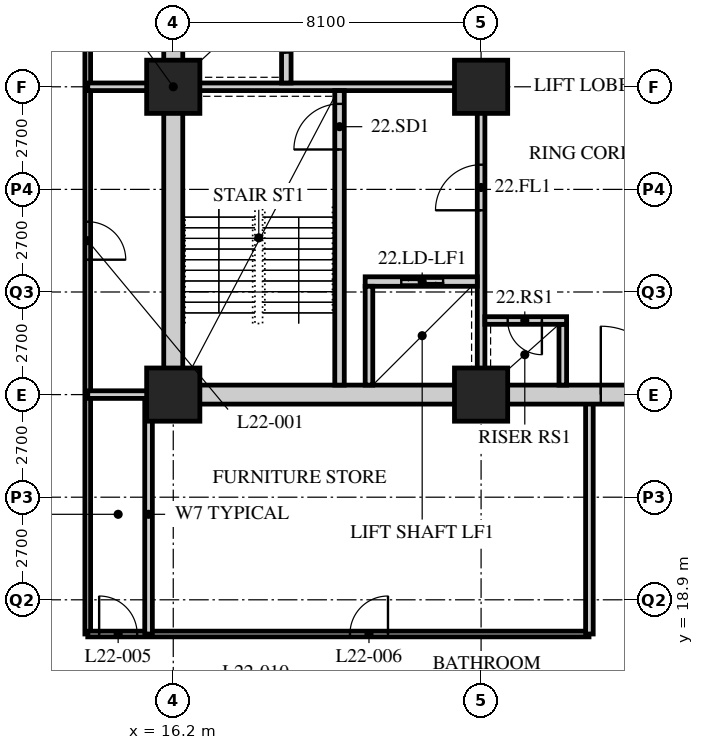
"""IFC4 building model, lengths in metres.
Left out: names, types, materials, properties, quantities, classifications, styles, units other than length and angle.
Written with IfcOpenShell. Run it as: python <this file> out.ifc"""

import sys

from ifc_helpers import new_model, si_unit, direction, frame, frame_2d, origin, origin_2d, place, context, subcontext, project, spatial, rectangle, hollow_rectangle, extrude, element, fill, save


model = new_model("IFC4")
c1 = context("Model", 3, precision=1e-05, world=origin(), true_north=direction((0.0, 1.0)))
c2 = subcontext(c1, "Body", "Model", "MODEL_VIEW")
j1 = project(units=[si_unit("LENGTHUNIT", "METRE"), si_unit("PLANEANGLEUNIT", "RADIAN")], contexts=[c1])
p1 = place(None, origin())
s1 = spatial("IfcSite", under=j1, at=p1, CompositionType="ELEMENT")
p2 = place(p1, origin())
s2 = spatial("IfcBuilding", under=s1, at=p2, CompositionType="ELEMENT")
p3 = place(p2, frame((0.0, 0.0, 87.4)))
s3 = spatial("IfcBuildingStorey", under=s2, at=p3, CompositionType="ELEMENT", Elevation=87.4)
for number, where, z_axis, x_axis in (
    (1, (16.2, 24.3, 0.0), (0.0, 0.0, 1.0), (1.0, 0.0, 0.0)),
    (2, (16.2, 32.4, 0.0), (0.0, 0.0, 1.0), (1.0, 0.0, 0.0)),
    (3, (24.3, 24.3, 0.0), (0.0, 0.0, 1.0), (1.0, 0.0, 0.0)),
    (4, (24.3, 32.4, 0.0), (0.0, 0.0, 1.0), (1.0, 0.0, 0.0)),
):
    element("IfcColumn", number, at=place(p3, frame(where, z_axis=z_axis, x_axis=x_axis)), inside=s3, PredefinedType="COLUMN", context=c2, shape_type="SweptSolid", body=[
        extrude(hollow_rectangle(XDim=1.4, YDim=1.4, WallThickness=0.12, at=origin_2d()), origin(), (0.0, 0.0, 1.0), 3.4),
    ])
p4 = place(p3, frame((13.95, 40.5, 0.0), z_axis=(0.0, 0.0, 1.0), x_axis=(0.0, -1.0, 0.0)))
e5 = element("IfcWall", 5, at=p4, inside=s3, PredefinedType="PARTITIONING", context=c2, shape_type="SweptSolid", body=[
    extrude(rectangle(XDim=22.5, YDim=0.15, at=frame_2d((11.25, 0.0))), origin(), (0.0, 0.0, 1.0), 3.15),
])
p5 = place(p4, frame((11.65, 0.0, 0.0)))
e6 = element("IfcOpeningElement", 6, at=p5, cuts=e5, PredefinedType="OPENING", context=c2, shape_type="SweptSolid", body=[
    extrude(rectangle(XDim=1.0, YDim=2.1, at=frame_2d((0.5, 1.05))), frame((0.0, 0.085, 0.0), z_axis=(0.0, -1.0, 0.0), x_axis=(1.0, 0.0, 0.0)), (0.0, 0.0, 1.0), 0.17),
])
p6 = place(p4, frame((3.55, 0.0, 0.0)))
e7 = element("IfcOpeningElement", 7, at=p6, cuts=e5, PredefinedType="OPENING", context=c2, shape_type="SweptSolid", body=[
    extrude(rectangle(XDim=1.0, YDim=2.1, at=frame_2d((0.5, 1.05))), frame((0.0, 0.085, 0.0), z_axis=(0.0, -1.0, 0.0), x_axis=(1.0, 0.0, 0.0)), (0.0, 0.0, 1.0), 0.17),
])
p7 = place(p3, frame((13.95, 18.0, 0.0), z_axis=(0.0, 0.0, 1.0), x_axis=(1.0, 0.0, 0.0)))
e8 = element("IfcWall", 8, at=p7, inside=s3, PredefinedType="PARTITIONING", context=c2, shape_type="SweptSolid", body=[
    extrude(rectangle(XDim=13.19, YDim=0.15, at=frame_2d((6.595, 0.0))), origin(), (0.0, 0.0, 1.0), 3.15),
])
p8 = place(p7, frame((0.3, 0.0, 0.0)))
e9 = element("IfcOpeningElement", 9, at=p8, cuts=e8, PredefinedType="OPENING", context=c2, shape_type="SweptSolid", body=[
    extrude(rectangle(XDim=1.0, YDim=2.1, at=frame_2d((0.5, 1.05))), frame((0.0, 0.085, 0.0), z_axis=(0.0, -1.0, 0.0), x_axis=(1.0, 0.0, 0.0)), (0.0, 0.0, 1.0), 0.17),
])
p9 = place(p7, frame((6.9, 0.0, 0.0)))
e10 = element("IfcOpeningElement", 10, at=p9, cuts=e8, PredefinedType="OPENING", context=c2, shape_type="SweptSolid", body=[
    extrude(rectangle(XDim=1.0, YDim=2.1, at=frame_2d((0.5, 1.05))), frame((0.0, 0.085, 0.0), z_axis=(0.0, -1.0, 0.0), x_axis=(1.0, 0.0, 0.0)), (0.0, 0.0, 1.0), 0.17),
])
p10 = place(p3, frame((13.95, 32.4, 0.0), z_axis=(0.0, 0.0, 1.0), x_axis=(1.0, 0.0, 0.0)))
e11 = element("IfcWall", 11, at=p10, inside=s3, PredefinedType="SOLIDWALL", context=c2, shape_type="SweptSolid", body=[
    extrude(rectangle(XDim=2.25, YDim=0.2, at=frame_2d((1.125, 0.0))), origin(), (0.0, 0.0, 1.0), 2.388),
])
for number, where, z_axis, x_axis in (
    (12, (15.55, 18.0, 0.0), (0.0, 0.0, 1.0), (0.0, 1.0, 0.0)),
    (13, (27.15, 18.0, 0.0), (0.0, 0.0, 1.0), (0.0, 1.0, 0.0)),
):
    element("IfcWall", number, at=place(p3, frame(where, z_axis=z_axis, x_axis=x_axis)), inside=s3, PredefinedType="SOLIDWALL", context=c2, shape_type="SweptSolid", body=[
        extrude(rectangle(XDim=6.3, YDim=0.2, at=frame_2d((3.15, 0.0))), origin(), (0.0, 0.0, 1.0), 3.15),
    ])
p11 = place(p3, frame((13.95, 24.3, 0.0), z_axis=(0.0, 0.0, 1.0), x_axis=(1.0, 0.0, 0.0)))
e14 = element("IfcWall", 14, at=p11, inside=s3, PredefinedType="SOLIDWALL", context=c2, shape_type="SweptSolid", body=[
    extrude(rectangle(XDim=2.25, YDim=0.2, at=frame_2d((1.125, 0.0))), origin(), (0.0, 0.0, 1.0), 2.05),
])
p12 = place(p3, frame((15.95, 24.3, 0.0), z_axis=(0.0, 0.0, 1.0), x_axis=(1.0, 0.0, 0.0)))
e15 = element("IfcWall", 15, at=p12, inside=s3, PredefinedType="SOLIDWALL", context=c2, shape_type="SweptSolid", body=[
    extrude(rectangle(XDim=8.35, YDim=0.5, at=frame_2d((4.175, 0.0))), origin(), (0.0, 0.0, 1.0), 2.388),
])
p13 = place(p3, frame((24.3, 24.3, 0.0), z_axis=(0.0, 0.0, 1.0), x_axis=(1.0, 0.0, 0.0)))
e16 = element("IfcWall", 16, at=p13, inside=s3, PredefinedType="SOLIDWALL", context=c2, shape_type="SweptSolid", body=[
    extrude(rectangle(XDim=8.1, YDim=0.5, at=frame_2d((4.05, 0.0))), origin(), (0.0, 0.0, 1.0), 2.5),
])
p14 = place(p13, frame((3.15, 0.0, 0.0)))
e17 = element("IfcOpeningElement", 17, at=p14, cuts=e16, PredefinedType="OPENING", context=c2, shape_type="SweptSolid", body=[
    extrude(rectangle(XDim=1.8, YDim=2.4, at=frame_2d((0.9, 1.2))), frame((0.0, 0.26, 0.0), z_axis=(0.0, -1.0, 0.0), x_axis=(1.0, 0.0, 0.0)), (0.0, 0.0, 1.0), 0.52),
])
p15 = place(p3, frame((16.2, 24.55, 0.0), z_axis=(0.0, 0.0, 1.0), x_axis=(0.0, 1.0, 0.0)))
e18 = element("IfcWall", 18, at=p15, inside=s3, PredefinedType="SOLIDWALL", context=c2, shape_type="SweptSolid", body=[
    extrude(rectangle(XDim=15.7, YDim=0.5, at=frame_2d((7.85, 0.0))), origin(), (0.0, 0.0, 1.0), 2.05),
])
p16 = place(p3, frame((16.45, 32.4, 0.0), z_axis=(0.0, 0.0, 1.0), x_axis=(1.0, 0.0, 0.0)))
e19 = element("IfcWall", 19, at=p16, inside=s3, PredefinedType="SOLIDWALL", context=c2, shape_type="SweptSolid", body=[
    extrude(rectangle(XDim=7.95, YDim=0.2, at=frame_2d((3.975, 0.0))), origin(), (0.0, 0.0, 1.0), 2.388),
])
p17 = place(p3, frame((24.3, 24.55, 0.0), z_axis=(0.0, 0.0, 1.0), x_axis=(0.0, 1.0, 0.0)))
e20 = element("IfcWall", 20, at=p17, inside=s3, PredefinedType="SOLIDWALL", context=c2, shape_type="SweptSolid", body=[
    extrude(rectangle(XDim=7.75, YDim=0.2, at=frame_2d((3.875, 0.0))), origin(), (0.0, 0.0, 1.0), 2.388),
])
p18 = place(p17, frame((4.6, 0.0, 0.0)))
e21 = element("IfcOpeningElement", 21, at=p18, cuts=e20, PredefinedType="OPENING", context=c2, shape_type="SweptSolid", body=[
    extrude(rectangle(XDim=1.2, YDim=2.1, at=frame_2d((0.6, 1.05))), frame((0.0, 0.11, 0.0), z_axis=(0.0, -1.0, 0.0), x_axis=(1.0, 0.0, 0.0)), (0.0, 0.0, 1.0), 0.22),
])
p19 = place(p3, frame((20.575, 24.55, 0.0), z_axis=(0.0, 0.0, 1.0), x_axis=(0.0, 1.0, 0.0)))
e22 = element("IfcWall", 22, at=p19, inside=s3, PredefinedType="SOLIDWALL", context=c2, shape_type="SweptSolid", body=[
    extrude(rectangle(XDim=7.75, YDim=0.25, at=frame_2d((3.875, 0.0))), origin(), (0.0, 0.0, 1.0), 3.15),
])
p20 = place(p19, frame((6.2, 0.0, 0.0)))
e23 = element("IfcOpeningElement", 23, at=p20, cuts=e22, PredefinedType="OPENING", context=c2, shape_type="SweptSolid", body=[
    extrude(rectangle(XDim=1.2, YDim=2.1, at=frame_2d((0.6, 1.05))), frame((0.0, 0.135, 0.0), z_axis=(0.0, -1.0, 0.0), x_axis=(1.0, 0.0, 0.0)), (0.0, 0.0, 1.0), 0.27),
])
p21 = place(p3, frame((21.25, 27.275, 0.0), z_axis=(0.0, 0.0, 1.0), x_axis=(1.0, 0.0, 0.0)))
e24 = element("IfcWall", 24, at=p21, inside=s3, PredefinedType="SOLIDWALL", context=c2, shape_type="SweptSolid", body=[
    extrude(rectangle(XDim=2.95, YDim=0.25, at=frame_2d((1.475, 0.0))), origin(), (0.0, 0.0, 1.0), 3.15),
])
p22 = place(p21, frame((0.95, 0.0, 0.0)))
e25 = element("IfcOpeningElement", 25, at=p22, cuts=e24, PredefinedType="OPENING", context=c2, shape_type="SweptSolid", body=[
    extrude(rectangle(XDim=1.1, YDim=2.4, at=frame_2d((0.55, 1.2))), frame((0.0, 0.135, 0.0), z_axis=(0.0, -1.0, 0.0), x_axis=(1.0, 0.0, 0.0)), (0.0, 0.0, 1.0), 0.27),
])
p23 = place(p3, frame((21.35, 24.55, 0.0), z_axis=(0.0, 0.0, 1.0), x_axis=(0.0, 1.0, 0.0)))
e26 = element("IfcWall", 26, at=p23, inside=s3, PredefinedType="SOLIDWALL", context=c2, shape_type="SweptSolid", body=[
    extrude(rectangle(XDim=2.6, YDim=0.2, at=frame_2d((1.3, 0.0))), origin(), (0.0, 0.0, 1.0), 3.15),
])
p24 = place(p3, frame((19.175, 32.5, 0.0), z_axis=(0.0, 0.0, 1.0), x_axis=(0.0, 1.0, 0.0)))
e27 = element("IfcWall", 27, at=p24, inside=s3, PredefinedType="SOLIDWALL", context=c2, shape_type="SweptSolid", body=[
    extrude(rectangle(XDim=7.75, YDim=0.25, at=frame_2d((3.875, 0.0))), origin(), (0.0, 0.0, 1.0), 3.15),
])
p25 = place(p24, frame((0.8, 0.0, 0.0)))
e28 = element("IfcOpeningElement", 28, at=p25, cuts=e27, PredefinedType="OPENING", context=c2, shape_type="SweptSolid", body=[
    extrude(rectangle(XDim=1.1, YDim=2.4, at=frame_2d((0.55, 1.2))), frame((0.0, 0.135, 0.0), z_axis=(0.0, -1.0, 0.0), x_axis=(1.0, 0.0, 0.0)), (0.0, 0.0, 1.0), 0.27),
])
p26 = place(p24, frame((3.4, 0.0, 0.0)))
e29 = element("IfcOpeningElement", 29, at=p26, cuts=e27, PredefinedType="OPENING", context=c2, shape_type="SweptSolid", body=[
    extrude(rectangle(XDim=1.1, YDim=2.4, at=frame_2d((0.55, 1.2))), frame((0.0, 0.135, 0.0), z_axis=(0.0, -1.0, 0.0), x_axis=(1.0, 0.0, 0.0)), (0.0, 0.0, 1.0), 0.27),
])
p27 = place(p24, frame((6.0, 0.0, 0.0)))
e30 = element("IfcOpeningElement", 30, at=p27, cuts=e27, PredefinedType="OPENING", context=c2, shape_type="SweptSolid", body=[
    extrude(rectangle(XDim=1.1, YDim=2.4, at=frame_2d((0.55, 1.2))), frame((0.0, 0.135, 0.0), z_axis=(0.0, -1.0, 0.0), x_axis=(1.0, 0.0, 0.0)), (0.0, 0.0, 1.0), 0.27),
])
p28 = place(p3, frame((26.45, 24.55, 0.0), z_axis=(0.0, 0.0, 1.0), x_axis=(0.0, 1.0, 0.0)))
e31 = element("IfcWall", 31, at=p28, inside=s3, PredefinedType="SOLIDWALL", context=c2, shape_type="SweptSolid", body=[
    extrude(rectangle(XDim=1.6, YDim=0.2, at=frame_2d((0.8, 0.0))), origin(), (0.0, 0.0, 1.0), 3.15),
])
p29 = place(p3, frame((24.4, 26.25, 0.0), z_axis=(0.0, 0.0, 1.0), x_axis=(1.0, 0.0, 0.0)))
e32 = element("IfcWall", 32, at=p29, inside=s3, PredefinedType="SOLIDWALL", context=c2, shape_type="SweptSolid", body=[
    extrude(rectangle(XDim=2.15, YDim=0.2, at=frame_2d((1.075, 0.0))), origin(), (0.0, 0.0, 1.0), 3.15),
])
p30 = place(p29, frame((0.6, 0.0, 0.0)))
e33 = element("IfcOpeningElement", 33, at=p30, cuts=e32, PredefinedType="OPENING", context=c2, shape_type="SweptSolid", body=[
    extrude(rectangle(XDim=0.9, YDim=2.1, at=frame_2d((0.45, 1.05))), frame((0.0, 0.11, 0.0), z_axis=(0.0, -1.0, 0.0), x_axis=(1.0, 0.0, 0.0)), (0.0, 0.0, 1.0), 0.22),
])
p31 = place(p5, origin())
e34 = element("IfcDoor", 34, at=p31, inside=s3, OperationType="SINGLE_SWING_RIGHT", PredefinedType="DOOR", context=c2, shape_type="SweptSolid", body=[
    extrude(rectangle(XDim=1.0, YDim=2.1, at=frame_2d((0.5, 1.05))), frame((0.0, 0.025, 0.0), z_axis=(0.0, -1.0, 0.0), x_axis=(1.0, 0.0, 0.0)), (0.0, 0.0, 1.0), 0.05),
])
fill(e6, e34)
p32 = place(p8, origin())
e35 = element("IfcDoor", 35, at=p32, inside=s3, OperationType="SINGLE_SWING_LEFT", PredefinedType="DOOR", context=c2, shape_type="SweptSolid", body=[
    extrude(rectangle(XDim=1.0, YDim=2.1, at=frame_2d((0.5, 1.05))), frame((0.0, 0.025, 0.0), z_axis=(0.0, -1.0, 0.0), x_axis=(1.0, 0.0, 0.0)), (0.0, 0.0, 1.0), 0.05),
])
fill(e9, e35)
p33 = place(p9, origin())
e36 = element("IfcDoor", 36, at=p33, inside=s3, OperationType="SINGLE_SWING_RIGHT", PredefinedType="DOOR", context=c2, shape_type="SweptSolid", body=[
    extrude(rectangle(XDim=1.0, YDim=2.1, at=frame_2d((0.5, 1.05))), frame((0.0, 0.025, 0.0), z_axis=(0.0, -1.0, 0.0), x_axis=(1.0, 0.0, 0.0)), (0.0, 0.0, 1.0), 0.05),
])
fill(e10, e36)
p34 = place(p20, origin())
e37 = element("IfcDoor", 37, at=p34, inside=s3, OperationType="SINGLE_SWING_LEFT", PredefinedType="DOOR", context=c2, shape_type="SweptSolid", body=[
    extrude(rectangle(XDim=1.2, YDim=2.1, at=frame_2d((0.6, 1.05))), frame((0.0, 0.025, 0.0), z_axis=(0.0, -1.0, 0.0), x_axis=(1.0, 0.0, 0.0)), (0.0, 0.0, 1.0), 0.05),
])
fill(e23, e37)
p35 = place(p18, origin())
e38 = element("IfcDoor", 38, at=p35, inside=s3, OperationType="SINGLE_SWING_LEFT", PredefinedType="DOOR", context=c2, shape_type="SweptSolid", body=[
    extrude(rectangle(XDim=1.2, YDim=2.1, at=frame_2d((0.6, 1.05))), frame((0.0, 0.025, 0.0), z_axis=(0.0, -1.0, 0.0), x_axis=(1.0, 0.0, 0.0)), (0.0, 0.0, 1.0), 0.05),
])
fill(e21, e38)
p36 = place(p30, origin())
e39 = element("IfcDoor", 39, at=p36, inside=s3, OperationType="SINGLE_SWING_LEFT", PredefinedType="DOOR", context=c2, shape_type="SweptSolid", body=[
    extrude(rectangle(XDim=0.9, YDim=2.1, at=frame_2d((0.45, 1.05))), frame((0.0, 0.025, 0.0), z_axis=(0.0, -1.0, 0.0), x_axis=(1.0, 0.0, 0.0)), (0.0, 0.0, 1.0), 0.05),
])
fill(e33, e39)
p37 = place(p25, origin())
e40 = element("IfcDoor", 40, at=p37, inside=s3, OperationType="DOUBLE_DOOR_SLIDING", PredefinedType="DOOR", context=c2, shape_type="SweptSolid", body=[
    extrude(rectangle(XDim=1.1, YDim=2.4, at=frame_2d((0.55, 1.2))), frame((0.0, 0.025, 0.0), z_axis=(0.0, -1.0, 0.0), x_axis=(1.0, 0.0, 0.0)), (0.0, 0.0, 1.0), 0.05),
])
fill(e28, e40)
p38 = place(p22, origin())
e41 = element("IfcDoor", 41, at=p38, inside=s3, OperationType="DOUBLE_DOOR_SLIDING", PredefinedType="DOOR", context=c2, shape_type="SweptSolid", body=[
    extrude(rectangle(XDim=1.1, YDim=2.4, at=frame_2d((0.55, 1.2))), frame((0.0, 0.025, 0.0), z_axis=(0.0, -1.0, 0.0), x_axis=(1.0, 0.0, 0.0)), (0.0, 0.0, 1.0), 0.05),
])
fill(e25, e41)
p39 = place(p14, origin())
e42 = element("IfcDoor", 42, at=p39, inside=s3, OperationType="DOUBLE_DOOR_SINGLE_SWING", PredefinedType="DOOR", context=c2, shape_type="SweptSolid", body=[
    extrude(rectangle(XDim=1.8, YDim=2.4, at=frame_2d((0.9, 1.2))), frame((0.0, 0.025, 0.0), z_axis=(0.0, -1.0, 0.0), x_axis=(1.0, 0.0, 0.0)), (0.0, 0.0, 1.0), 0.05),
])
fill(e17, e42)
save(model, sys.argv[1])
